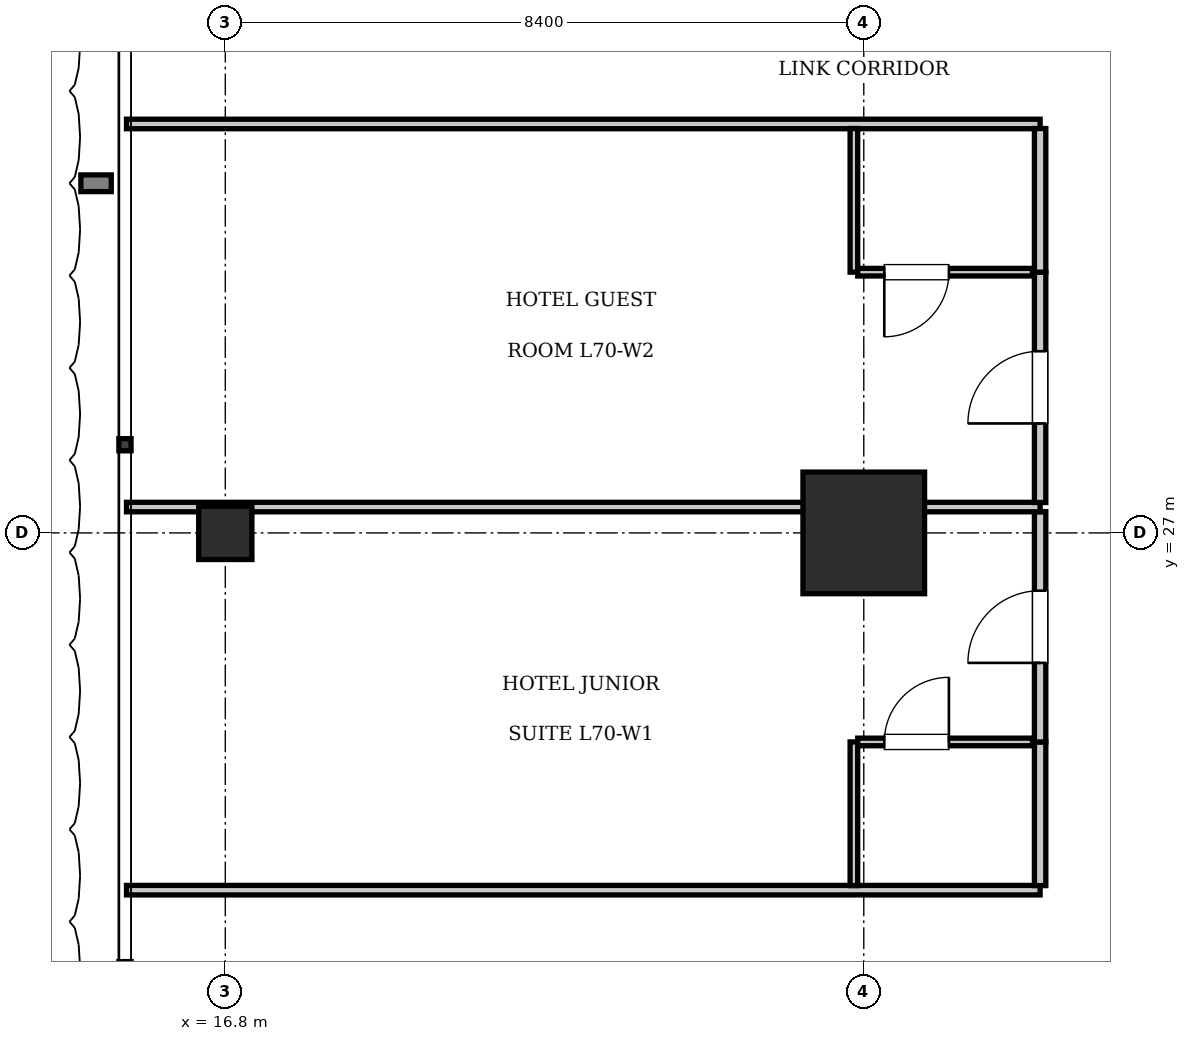
"""IFC4 building model, lengths in metres.
Left out: names, types, materials, properties, quantities, classifications, styles, units other than length and angle.
Written with IfcOpenShell. Run it as: python <this file> out.ifc"""

import sys

from ifc_helpers import new_model, si_unit, direction, frame, frame_2d, origin, origin_2d, place, context, subcontext, project, spatial, rectangle, extrude, element, fill, save


model = new_model("IFC4")
c1 = context("Model", 3, precision=1e-05, world=origin(), true_north=direction((0.0, 1.0)))
c2 = subcontext(c1, "Body", "Model", "MODEL_VIEW")
j1 = project(units=[si_unit("LENGTHUNIT", "METRE"), si_unit("PLANEANGLEUNIT", "RADIAN")], contexts=[c1])
p1 = place(None, origin())
s1 = spatial("IfcSite", under=j1, at=p1, CompositionType="ELEMENT")
p2 = place(p1, origin())
s2 = spatial("IfcBuilding", under=s1, at=p2, CompositionType="ELEMENT")
p3 = place(p2, frame((0.0, 0.0, 285.6)))
s3 = spatial("IfcBuildingStorey", under=s2, at=p3, CompositionType="ELEMENT", Elevation=285.6)
p4 = place(p3, frame((25.2, 27.0, 0.0), z_axis=(0.0, 0.0, 1.0), x_axis=(1.0, 0.0, 0.0)))
e1 = element("IfcColumn", 1, at=p4, inside=s3, PredefinedType="COLUMN", context=c2, shape_type="SweptSolid", body=[
    extrude(rectangle(XDim=1.6, YDim=1.6, at=origin_2d()), origin(), (0.0, 0.0, 1.0), 3.85),
])
p5 = place(p3, frame((16.8, 27.0, 0.0), z_axis=(0.0, 0.0, 1.0), x_axis=(1.0, 0.0, 0.0)))
e2 = element("IfcColumn", 2, at=p5, inside=s3, PredefinedType="COLUMN", context=c2, shape_type="SweptSolid", body=[
    extrude(rectangle(XDim=0.7, YDim=0.7, at=origin_2d()), origin(), (0.0, 0.0, 1.0), 3.85),
])
for number, where, z_axis, x_axis in (
    (3, (15.5, 22.3, 0.0), (0.0, 0.0, 1.0), (1.0, 0.0, 0.0)),
    (4, (15.5, 32.38, 0.0), (0.0, 0.0, 1.0), (1.0, 0.0, 0.0)),
):
    element("IfcWall", number, at=place(p3, frame(where, z_axis=z_axis, x_axis=x_axis)), inside=s3, PredefinedType="PARTITIONING", context=c2, shape_type="SweptSolid", body=[
        extrude(rectangle(XDim=12.02, YDim=0.125, at=frame_2d((6.01, 0.0))), origin(), (0.0, 0.0, 1.0), 3.61),
    ])
p6 = place(p3, frame((27.52, 22.36, 0.0), z_axis=(0.0, 0.0, 1.0), x_axis=(0.0, 1.0, 0.0)))
e5 = element("IfcWall", 5, at=p6, inside=s3, PredefinedType="PARTITIONING", context=c2, shape_type="SweptSolid", body=[
    extrude(rectangle(XDim=1.89, YDim=0.15, at=frame_2d((0.945, 0.0))), origin(), (0.0, 0.0, 1.0), 3.61),
])
p7 = place(p3, frame((27.52, 24.25, 0.0), z_axis=(0.0, 0.0, 1.0), x_axis=(0.0, 1.0, 0.0)))
e6 = element("IfcWall", 6, at=p7, inside=s3, PredefinedType="PARTITIONING", context=c2, shape_type="SweptSolid", body=[
    extrude(rectangle(XDim=3.03, YDim=0.15, at=frame_2d((1.515, 0.0))), origin(), (0.0, 0.0, 1.0), 3.61),
])
p8 = place(p7, frame((1.04, 0.0, 0.0)))
e7 = element("IfcOpeningElement", 7, at=p8, cuts=e6, PredefinedType="OPENING", context=c2, shape_type="SweptSolid", body=[
    extrude(rectangle(XDim=0.95, YDim=2.15, at=frame_2d((0.475, 1.075))), frame((0.0, 0.085, 0.0), z_axis=(0.0, -1.0, 0.0), x_axis=(1.0, 0.0, 0.0)), (0.0, 0.0, 1.0), 0.17),
])
p9 = place(p3, frame((25.07, 22.36, 0.0), z_axis=(0.0, 0.0, 1.0), x_axis=(0.0, 1.0, 0.0)))
e8 = element("IfcWall", 8, at=p9, inside=s3, PredefinedType="PARTITIONING", context=c2, shape_type="SweptSolid", body=[
    extrude(rectangle(XDim=1.89, YDim=0.1, at=frame_2d((0.945, 0.0))), origin(), (0.0, 0.0, 1.0), 3.61),
])
p10 = place(p3, frame((25.12, 24.25, 0.0), z_axis=(0.0, 0.0, 1.0), x_axis=(1.0, 0.0, 0.0)))
e9 = element("IfcWall", 9, at=p10, inside=s3, PredefinedType="PARTITIONING", context=c2, shape_type="SweptSolid", body=[
    extrude(rectangle(XDim=2.3, YDim=0.1, at=frame_2d((1.15, 0.0))), origin(), (0.0, 0.0, 1.0), 3.61),
])
p11 = place(p10, frame((0.35, 0.0, 0.0)))
e10 = element("IfcOpeningElement", 10, at=p11, cuts=e9, PredefinedType="OPENING", context=c2, shape_type="SweptSolid", body=[
    extrude(rectangle(XDim=0.85, YDim=2.1, at=frame_2d((0.425, 1.05))), frame((0.0, 0.06, 0.0), z_axis=(0.0, -1.0, 0.0), x_axis=(1.0, 0.0, 0.0)), (0.0, 0.0, 1.0), 0.12),
])
p12 = place(p3, frame((15.5, 27.34, 0.0), z_axis=(0.0, 0.0, 1.0), x_axis=(1.0, 0.0, 0.0)))
e11 = element("IfcWall", 11, at=p12, inside=s3, PredefinedType="PARTITIONING", context=c2, shape_type="SweptSolid", body=[
    extrude(rectangle(XDim=12.02, YDim=0.125, at=frame_2d((6.01, 0.0))), origin(), (0.0, 0.0, 1.0), 3.61),
])
p13 = place(p3, frame((27.52, 27.4, 0.0), z_axis=(0.0, 0.0, 1.0), x_axis=(0.0, 1.0, 0.0)))
e12 = element("IfcWall", 12, at=p13, inside=s3, PredefinedType="PARTITIONING", context=c2, shape_type="SweptSolid", body=[
    extrude(rectangle(XDim=3.03, YDim=0.15, at=frame_2d((1.515, 0.0))), origin(), (0.0, 0.0, 1.0), 3.61),
])
p14 = place(p13, frame((1.04, 0.0, 0.0)))
e13 = element("IfcOpeningElement", 13, at=p14, cuts=e12, PredefinedType="OPENING", context=c2, shape_type="SweptSolid", body=[
    extrude(rectangle(XDim=0.95, YDim=2.15, at=frame_2d((0.475, 1.075))), frame((0.0, 0.085, 0.0), z_axis=(0.0, -1.0, 0.0), x_axis=(1.0, 0.0, 0.0)), (0.0, 0.0, 1.0), 0.17),
])
p15 = place(p3, frame((27.52, 30.43, 0.0), z_axis=(0.0, 0.0, 1.0), x_axis=(0.0, 1.0, 0.0)))
e14 = element("IfcWall", 14, at=p15, inside=s3, PredefinedType="PARTITIONING", context=c2, shape_type="SweptSolid", body=[
    extrude(rectangle(XDim=1.89, YDim=0.15, at=frame_2d((0.945, 0.0))), origin(), (0.0, 0.0, 1.0), 3.61),
])
p16 = place(p3, frame((25.07, 30.43, 0.0), z_axis=(0.0, 0.0, 1.0), x_axis=(0.0, 1.0, 0.0)))
e15 = element("IfcWall", 15, at=p16, inside=s3, PredefinedType="PARTITIONING", context=c2, shape_type="SweptSolid", body=[
    extrude(rectangle(XDim=1.89, YDim=0.1, at=frame_2d((0.945, 0.0))), origin(), (0.0, 0.0, 1.0), 3.61),
])
p17 = place(p3, frame((25.12, 30.43, 0.0), z_axis=(0.0, 0.0, 1.0), x_axis=(1.0, 0.0, 0.0)))
e16 = element("IfcWall", 16, at=p17, inside=s3, PredefinedType="PARTITIONING", context=c2, shape_type="SweptSolid", body=[
    extrude(rectangle(XDim=2.3, YDim=0.1, at=frame_2d((1.15, 0.0))), origin(), (0.0, 0.0, 1.0), 3.61),
])
p18 = place(p17, frame((0.35, 0.0, 0.0)))
e17 = element("IfcOpeningElement", 17, at=p18, cuts=e16, PredefinedType="OPENING", context=c2, shape_type="SweptSolid", body=[
    extrude(rectangle(XDim=0.85, YDim=2.1, at=frame_2d((0.425, 1.05))), frame((0.0, 0.06, 0.0), z_axis=(0.0, -1.0, 0.0), x_axis=(1.0, 0.0, 0.0)), (0.0, 0.0, 1.0), 0.12),
])
p19 = place(p11, origin())
e18 = element("IfcDoor", 18, at=p19, inside=s3, OperationType="SINGLE_SWING_RIGHT", PredefinedType="DOOR", context=c2, shape_type="SweptSolid", body=[
    extrude(rectangle(XDim=0.85, YDim=2.1, at=frame_2d((0.425, 1.05))), frame((0.0, 0.025, 0.0), z_axis=(0.0, -1.0, 0.0), x_axis=(1.0, 0.0, 0.0)), (0.0, 0.0, 1.0), 0.05),
])
fill(e10, e18)
p20 = place(p8, origin())
e19 = element("IfcDoor", 19, at=p20, inside=s3, OperationType="SINGLE_SWING_LEFT", PredefinedType="DOOR", context=c2, shape_type="SweptSolid", body=[
    extrude(rectangle(XDim=0.95, YDim=2.15, at=frame_2d((0.475, 1.075))), frame((0.0, 0.025, 0.0), z_axis=(0.0, -1.0, 0.0), x_axis=(1.0, 0.0, 0.0)), (0.0, 0.0, 1.0), 0.05),
])
fill(e7, e19)
p21 = place(p18, frame((0.85, 0.0, 0.0), z_axis=(0.0, 0.0, 1.0), x_axis=(-1.0, 0.0, 0.0)))
e20 = element("IfcDoor", 20, at=p21, inside=s3, OperationType="SINGLE_SWING_RIGHT", PredefinedType="DOOR", context=c2, shape_type="SweptSolid", body=[
    extrude(rectangle(XDim=0.85, YDim=2.1, at=frame_2d((0.425, 1.05))), frame((0.0, 0.025, 0.0), z_axis=(0.0, -1.0, 0.0), x_axis=(1.0, 0.0, 0.0)), (0.0, 0.0, 1.0), 0.05),
])
fill(e17, e20)
p22 = place(p14, origin())
e21 = element("IfcDoor", 21, at=p22, inside=s3, OperationType="SINGLE_SWING_LEFT", PredefinedType="DOOR", context=c2, shape_type="SweptSolid", body=[
    extrude(rectangle(XDim=0.95, YDim=2.15, at=frame_2d((0.475, 1.075))), frame((0.0, 0.025, 0.0), z_axis=(0.0, -1.0, 0.0), x_axis=(1.0, 0.0, 0.0)), (0.0, 0.0, 1.0), 0.05),
])
fill(e13, e21)
save(model, sys.argv[1])
